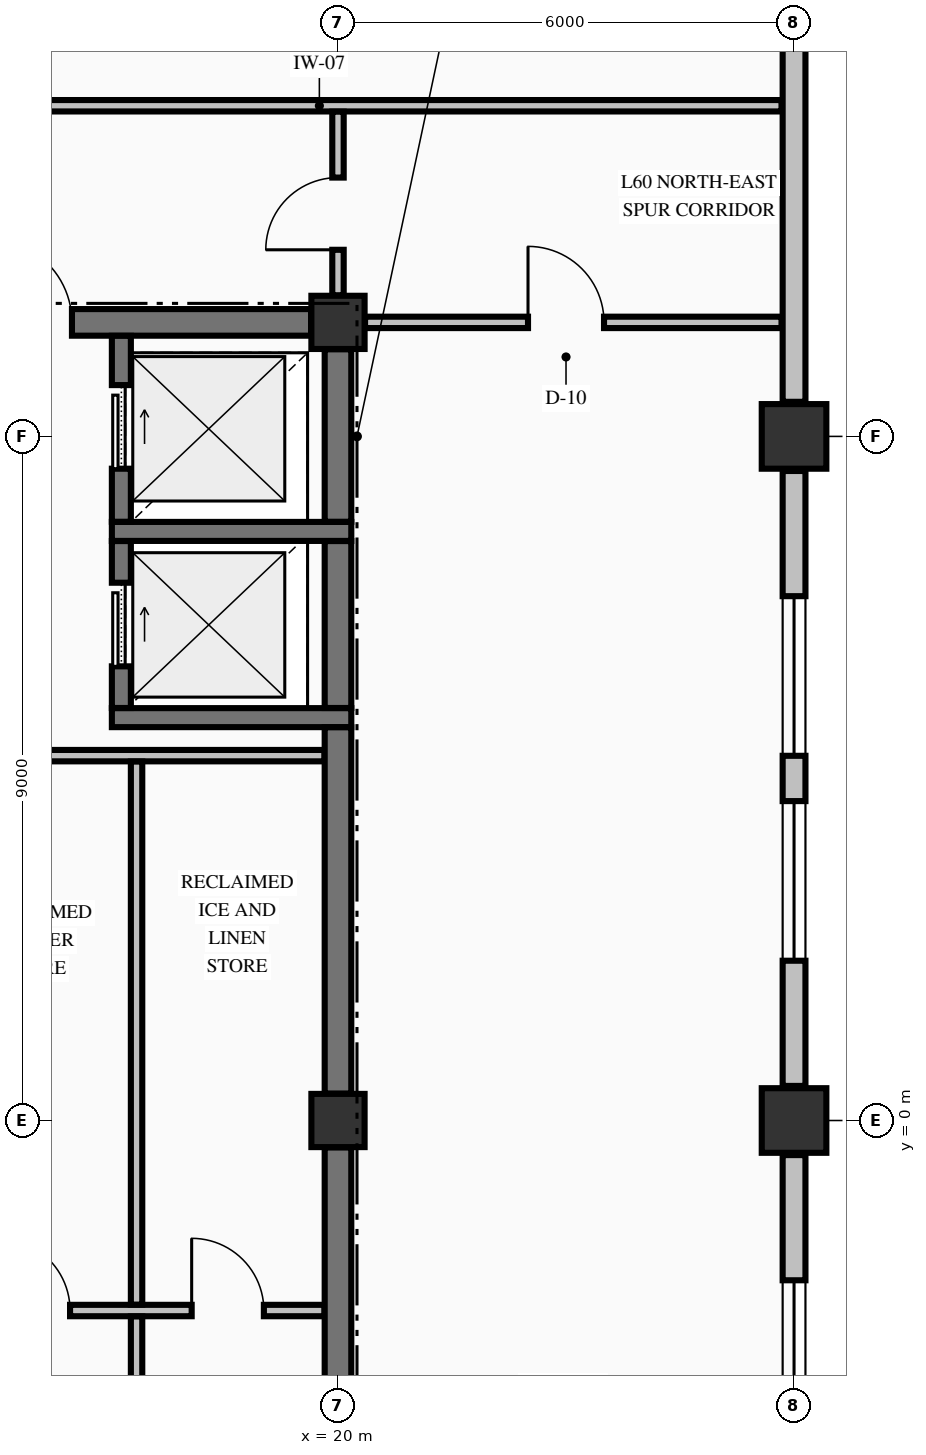
"""IFC4 building model, lengths in metres.
Left out: names, types, materials, properties, quantities, classifications, styles, units other than length and angle.
Written with IfcOpenShell. Run it as: python <this file> out.ifc"""

import sys

from ifc_helpers import new_model, si_unit, direction, frame, frame_2d, origin, origin_2d, place, context, subcontext, project, spatial, rectangle, extrude, element, fill, save


model = new_model("IFC4")
c1 = context("Model", 3, precision=1e-05, world=origin(), true_north=direction((0.0, 1.0)))
c2 = subcontext(c1, "Body", "Model", "MODEL_VIEW")
j1 = project(units=[si_unit("LENGTHUNIT", "METRE"), si_unit("PLANEANGLEUNIT", "RADIAN")], contexts=[c1])
p1 = place(None, origin())
s1 = spatial("IfcSite", under=j1, at=p1, CompositionType="ELEMENT")
p2 = place(p1, origin())
s2 = spatial("IfcBuilding", under=s1, at=p2, CompositionType="ELEMENT")
p3 = place(p2, frame((0.0, 0.0, 230.05)))
s3 = spatial("IfcBuildingStorey", under=s2, at=p3, CompositionType="ELEMENT", Elevation=230.05)
for number, where, z_axis, x_axis in (
    (1, (26.0, 0.0, -0.25), (0.0, 0.0, 1.0), (1.0, 0.0, 0.0)),
    (2, (26.0, 9.0, -0.25), (0.0, 0.0, 1.0), (1.0, 0.0, 0.0)),
):
    element("IfcColumn", number, at=place(p3, frame(where, z_axis=z_axis, x_axis=x_axis)), inside=s3, PredefinedType="COLUMN", context=c2, shape_type="SweptSolid", body=[
        extrude(rectangle(XDim=0.85, YDim=0.85, at=origin_2d()), origin(), (0.0, 0.0, 1.0), 3.23),
    ])
for number, where, z_axis, x_axis in (
    (3, (20.0, 10.5, -0.25), (0.0, 0.0, 1.0), (1.0, 0.0, 0.0)),
    (4, (20.0, 0.0, -0.25), (0.0, 0.0, 1.0), (1.0, 0.0, 0.0)),
):
    element("IfcColumn", number, at=place(p3, frame(where, z_axis=z_axis, x_axis=x_axis)), inside=s3, PredefinedType="COLUMN", context=c2, shape_type="SweptSolid", body=[
        extrude(rectangle(XDim=0.7, YDim=0.7, at=origin_2d()), origin(), (0.0, 0.0, 1.0), 3.23),
    ])
p4 = place(p3, frame((26.0, -8.545, 0.0), z_axis=(0.0, 0.0, 1.0), x_axis=(0.0, 1.0, 0.0)))
e5 = element("IfcWall", 5, at=p4, inside=s3, PredefinedType="STANDARD", context=c2, shape_type="SweptSolid", body=[
    extrude(rectangle(XDim=8.09, YDim=0.3, at=frame_2d((4.045, 0.0))), origin(), (0.0, 0.0, 1.0), 2.372),
])
p5 = place(p4, frame((1.647, 0.0, 0.7)))
e6 = element("IfcOpeningElement", 6, at=p5, cuts=e5, PredefinedType="OPENING", context=c2, shape_type="SweptSolid", body=[
    extrude(rectangle(XDim=2.1, YDim=1.5, at=frame_2d((1.05, 0.75))), frame((0.0, 0.16, 0.0), z_axis=(0.0, -1.0, 0.0), x_axis=(1.0, 0.0, 0.0)), (0.0, 0.0, 1.0), 0.32),
])
p6 = place(p4, frame((4.343, 0.0, 0.7)))
e7 = element("IfcOpeningElement", 7, at=p6, cuts=e5, PredefinedType="OPENING", context=c2, shape_type="SweptSolid", body=[
    extrude(rectangle(XDim=2.1, YDim=1.5, at=frame_2d((1.05, 0.75))), frame((0.0, 0.16, 0.0), z_axis=(0.0, -1.0, 0.0), x_axis=(1.0, 0.0, 0.0)), (0.0, 0.0, 1.0), 0.32),
])
p7 = place(p3, frame((26.0, 0.455, 0.0), z_axis=(0.0, 0.0, 1.0), x_axis=(0.0, 1.0, 0.0)))
e8 = element("IfcWall", 8, at=p7, inside=s3, PredefinedType="STANDARD", context=c2, shape_type="SweptSolid", body=[
    extrude(rectangle(XDim=8.09, YDim=0.3, at=frame_2d((4.045, 0.0))), origin(), (0.0, 0.0, 1.0), 2.372),
])
p8 = place(p7, frame((1.647, 0.0, 0.7)))
e9 = element("IfcOpeningElement", 9, at=p8, cuts=e8, PredefinedType="OPENING", context=c2, shape_type="SweptSolid", body=[
    extrude(rectangle(XDim=2.1, YDim=1.5, at=frame_2d((1.05, 0.75))), frame((0.0, 0.16, 0.0), z_axis=(0.0, -1.0, 0.0), x_axis=(1.0, 0.0, 0.0)), (0.0, 0.0, 1.0), 0.32),
])
p9 = place(p7, frame((4.343, 0.0, 0.7)))
e10 = element("IfcOpeningElement", 10, at=p9, cuts=e8, PredefinedType="OPENING", context=c2, shape_type="SweptSolid", body=[
    extrude(rectangle(XDim=2.1, YDim=1.5, at=frame_2d((1.05, 0.75))), frame((0.0, 0.16, 0.0), z_axis=(0.0, -1.0, 0.0), x_axis=(1.0, 0.0, 0.0)), (0.0, 0.0, 1.0), 0.32),
])
p10 = place(p3, frame((26.0, 9.455, 0.0), z_axis=(0.0, 0.0, 1.0), x_axis=(0.0, 1.0, 0.0)))
e11 = element("IfcWall", 11, at=p10, inside=s3, PredefinedType="STANDARD", context=c2, shape_type="SweptSolid", body=[
    extrude(rectangle(XDim=8.09, YDim=0.3, at=frame_2d((4.045, 0.0))), origin(), (0.0, 0.0, 1.0), 2.372),
])
for number, where, z_axis, x_axis in (
    (12, (17.025, 5.3, 0.0), (0.0, 0.0, 1.0), (1.0, 0.0, 0.0)),
    (13, (17.025, 7.75, 0.0), (0.0, 0.0, 1.0), (1.0, 0.0, 0.0)),
):
    element("IfcWall", number, at=place(p3, frame(where, z_axis=z_axis, x_axis=x_axis)), inside=s3, PredefinedType="SOLIDWALL", context=c2, shape_type="SweptSolid", body=[
        extrude(rectangle(XDim=3.15, YDim=0.25, at=frame_2d((1.575, 0.0))), origin(), (0.0, 0.0, 1.0), 2.98),
    ])
p11 = place(p3, frame((14.7, 10.5, 0.0), z_axis=(0.0, 0.0, 1.0), x_axis=(1.0, 0.0, 0.0)))
e14 = element("IfcWall", 14, at=p11, inside=s3, PredefinedType="SHEAR", context=c2, shape_type="SweptSolid", body=[
    extrude(rectangle(XDim=4.946, YDim=0.35, at=frame_2d((2.473, 0.0))), origin(), (0.0, 0.0, 1.0), 2.98),
])
p12 = place(p11, frame((0.7, 0.0, 0.0)))
e15 = element("IfcOpeningElement", 15, at=p12, cuts=e14, PredefinedType="OPENING", context=c2, shape_type="SweptSolid", body=[
    extrude(rectangle(XDim=1.1, YDim=2.15, at=frame_2d((0.55, 1.075))), frame((0.0, 0.185, 0.0), z_axis=(0.0, -1.0, 0.0), x_axis=(1.0, 0.0, 0.0)), (0.0, 0.0, 1.0), 0.37),
])
p13 = place(p3, frame((14.878, -2.5, 0.0), z_axis=(0.0, 0.0, 1.0), x_axis=(1.0, 0.0, 0.0)))
e16 = element("IfcWall", 16, at=p13, inside=s3, PredefinedType="PARTITIONING", context=c2, shape_type="SweptSolid", body=[
    extrude(rectangle(XDim=4.944, YDim=0.15, at=frame_2d((2.472, 0.0))), origin(), (0.0, 0.0, 1.0), 2.98),
])
p14 = place(p13, frame((0.647, 0.0, 0.0)))
e17 = element("IfcOpeningElement", 17, at=p14, cuts=e16, PredefinedType="OPENING", context=c2, shape_type="SweptSolid", body=[
    extrude(rectangle(XDim=0.95, YDim=2.15, at=frame_2d((0.475, 1.075))), frame((0.0, 0.085, 0.0), z_axis=(0.0, -1.0, 0.0), x_axis=(1.0, 0.0, 0.0)), (0.0, 0.0, 1.0), 0.17),
])
p15 = place(p13, frame((3.197, 0.0, 0.0)))
e18 = element("IfcOpeningElement", 18, at=p15, cuts=e16, PredefinedType="OPENING", context=c2, shape_type="SweptSolid", body=[
    extrude(rectangle(XDim=0.95, YDim=2.15, at=frame_2d((0.475, 1.075))), frame((0.0, 0.085, 0.0), z_axis=(0.0, -1.0, 0.0), x_axis=(1.0, 0.0, 0.0)), (0.0, 0.0, 1.0), 0.17),
])
p16 = place(p3, frame((14.878, 4.8, 0.0), z_axis=(0.0, 0.0, 1.0), x_axis=(1.0, 0.0, 0.0)))
e19 = element("IfcWall", 19, at=p16, inside=s3, PredefinedType="PARTITIONING", context=c2, shape_type="SweptSolid", body=[
    extrude(rectangle(XDim=4.944, YDim=0.15, at=frame_2d((2.472, 0.0))), origin(), (0.0, 0.0, 1.0), 2.98),
])
p17 = place(p3, frame((20.356, 10.5, 0.0), z_axis=(0.0, 0.0, 1.0), x_axis=(1.0, 0.0, 0.0)))
e20 = element("IfcWall", 20, at=p17, inside=s3, PredefinedType="PARTITIONING", context=c2, shape_type="SweptSolid", body=[
    extrude(rectangle(XDim=5.479, YDim=0.15, at=frame_2d((2.74, 0.0))), origin(), (0.0, 0.0, 1.0), 2.98),
])
p18 = place(p17, frame((2.144, 0.0, 0.0)))
e21 = element("IfcOpeningElement", 21, at=p18, cuts=e20, PredefinedType="OPENING", context=c2, shape_type="SweptSolid", body=[
    extrude(rectangle(XDim=1.0, YDim=2.15, at=frame_2d((0.5, 1.075))), frame((0.0, 0.085, 0.0), z_axis=(0.0, -1.0, 0.0), x_axis=(1.0, 0.0, 0.0)), (0.0, 0.0, 1.0), 0.17),
])
p19 = place(p3, frame((-20.075, 13.35, 0.0), z_axis=(0.0, 0.0, 1.0), x_axis=(1.0, 0.0, 0.0)))
e22 = element("IfcWall", 22, at=p19, inside=s3, PredefinedType="PARTITIONING", context=c2, shape_type="SweptSolid", body=[
    extrude(rectangle(XDim=45.91, YDim=0.15, at=frame_2d((22.955, 0.0))), origin(), (0.0, 0.0, 1.0), 2.98),
])
p20 = place(p19, frame((11.2, 0.0, 0.0)))
e23 = element("IfcOpeningElement", 23, at=p20, cuts=e22, PredefinedType="OPENING", context=c2, shape_type="SweptSolid", body=[
    extrude(rectangle(XDim=1.05, YDim=2.15, at=frame_2d((0.525, 1.075))), frame((0.0, 0.085, 0.0), z_axis=(0.0, -1.0, 0.0), x_axis=(1.0, 0.0, 0.0)), (0.0, 0.0, 1.0), 0.17),
])
p21 = place(p19, frame((24.4, 0.0, 0.0)))
e24 = element("IfcOpeningElement", 24, at=p21, cuts=e22, PredefinedType="OPENING", context=c2, shape_type="SweptSolid", body=[
    extrude(rectangle(XDim=1.05, YDim=2.15, at=frame_2d((0.525, 1.075))), frame((0.0, 0.085, 0.0), z_axis=(0.0, -1.0, 0.0), x_axis=(1.0, 0.0, 0.0)), (0.0, 0.0, 1.0), 0.17),
])
p22 = place(p19, frame((32.7, 0.0, 0.0)))
e25 = element("IfcOpeningElement", 25, at=p22, cuts=e22, PredefinedType="OPENING", context=c2, shape_type="SweptSolid", body=[
    extrude(rectangle(XDim=1.05, YDim=2.15, at=frame_2d((0.525, 1.075))), frame((0.0, 0.085, 0.0), z_axis=(0.0, -1.0, 0.0), x_axis=(1.0, 0.0, 0.0)), (0.0, 0.0, 1.0), 0.17),
])
p23 = place(p3, frame((17.15, 5.427, 0.0), z_axis=(0.0, 0.0, 1.0), x_axis=(0.0, 1.0, 0.0)))
e26 = element("IfcWall", 26, at=p23, inside=s3, PredefinedType="SOLIDWALL", context=c2, shape_type="SweptSolid", body=[
    extrude(rectangle(XDim=2.196, YDim=0.25, at=frame_2d((1.098, 0.0))), origin(), (0.0, 0.0, 1.0), 2.98),
])
p24 = place(p23, frame((0.548, 0.0, 0.0)))
e27 = element("IfcOpeningElement", 27, at=p24, cuts=e26, PredefinedType="OPENING", context=c2, shape_type="SweptSolid", body=[
    extrude(rectangle(XDim=1.1, YDim=2.2, at=frame_2d((0.55, 1.1))), frame((0.0, 0.135, 0.0), z_axis=(0.0, -1.0, 0.0), x_axis=(1.0, 0.0, 0.0)), (0.0, 0.0, 1.0), 0.27),
])
p25 = place(p3, frame((17.15, 7.877, 0.0), z_axis=(0.0, 0.0, 1.0), x_axis=(0.0, 1.0, 0.0)))
e28 = element("IfcWall", 28, at=p25, inside=s3, PredefinedType="SOLIDWALL", context=c2, shape_type="SweptSolid", body=[
    extrude(rectangle(XDim=2.446, YDim=0.25, at=frame_2d((1.223, 0.0))), origin(), (0.0, 0.0, 1.0), 2.98),
])
p26 = place(p25, frame((0.698, 0.0, 0.0)))
e29 = element("IfcOpeningElement", 29, at=p26, cuts=e28, PredefinedType="OPENING", context=c2, shape_type="SweptSolid", body=[
    extrude(rectangle(XDim=1.1, YDim=2.2, at=frame_2d((0.55, 1.1))), frame((0.0, 0.135, 0.0), z_axis=(0.0, -1.0, 0.0), x_axis=(1.0, 0.0, 0.0)), (0.0, 0.0, 1.0), 0.27),
])
p27 = place(p3, frame((20.0, -9.596, 0.0), z_axis=(0.0, 0.0, 1.0), x_axis=(0.0, 1.0, 0.0)))
e30 = element("IfcWall", 30, at=p27, inside=s3, PredefinedType="SHEAR", context=c2, shape_type="SweptSolid", body=[
    extrude(rectangle(XDim=9.242, YDim=0.35, at=frame_2d((4.621, 0.0))), origin(), (0.0, 0.0, 1.0), 2.98),
])
p28 = place(p3, frame((20.0, 0.354, 0.0), z_axis=(0.0, 0.0, 1.0), x_axis=(0.0, 1.0, 0.0)))
e31 = element("IfcWall", 31, at=p28, inside=s3, PredefinedType="SHEAR", context=c2, shape_type="SweptSolid", body=[
    extrude(rectangle(XDim=4.819, YDim=0.35, at=frame_2d((2.41, 0.0))), origin(), (0.0, 0.0, 1.0), 2.98),
])
p29 = place(p3, frame((20.0, 5.427, 0.0), z_axis=(0.0, 0.0, 1.0), x_axis=(0.0, 1.0, 0.0)))
e32 = element("IfcWall", 32, at=p29, inside=s3, PredefinedType="SHEAR", context=c2, shape_type="SweptSolid", body=[
    extrude(rectangle(XDim=2.196, YDim=0.35, at=frame_2d((1.098, 0.0))), origin(), (0.0, 0.0, 1.0), 2.98),
])
p30 = place(p3, frame((20.0, 7.877, 0.0), z_axis=(0.0, 0.0, 1.0), x_axis=(0.0, 1.0, 0.0)))
e33 = element("IfcWall", 33, at=p30, inside=s3, PredefinedType="SHEAR", context=c2, shape_type="SweptSolid", body=[
    extrude(rectangle(XDim=2.269, YDim=0.35, at=frame_2d((1.135, 0.0))), origin(), (0.0, 0.0, 1.0), 2.98),
])
p31 = place(p3, frame((17.35, -9.772, 0.0), z_axis=(0.0, 0.0, 1.0), x_axis=(0.0, 1.0, 0.0)))
e34 = element("IfcWall", 34, at=p31, inside=s3, PredefinedType="PARTITIONING", context=c2, shape_type="SweptSolid", body=[
    extrude(rectangle(XDim=7.194, YDim=0.15, at=frame_2d((3.597, 0.0))), origin(), (0.0, 0.0, 1.0), 2.98),
])
p32 = place(p3, frame((17.35, -2.422, 0.0), z_axis=(0.0, 0.0, 1.0), x_axis=(0.0, 1.0, 0.0)))
e35 = element("IfcWall", 35, at=p32, inside=s3, PredefinedType="PARTITIONING", context=c2, shape_type="SweptSolid", body=[
    extrude(rectangle(XDim=7.144, YDim=0.15, at=frame_2d((3.572, 0.0))), origin(), (0.0, 0.0, 1.0), 2.98),
])
p33 = place(p3, frame((20.0, 10.856, 0.0), z_axis=(0.0, 0.0, 1.0), x_axis=(0.0, 1.0, 0.0)))
e36 = element("IfcWall", 36, at=p33, inside=s3, PredefinedType="PARTITIONING", context=c2, shape_type="SweptSolid", body=[
    extrude(rectangle(XDim=2.416, YDim=0.15, at=frame_2d((1.208, 0.0))), origin(), (0.0, 0.0, 1.0), 2.98),
])
p34 = place(p33, frame((0.599, 0.0, 0.0)))
e37 = element("IfcOpeningElement", 37, at=p34, cuts=e36, PredefinedType="OPENING", context=c2, shape_type="SweptSolid", body=[
    extrude(rectangle(XDim=0.95, YDim=2.15, at=frame_2d((0.475, 1.075))), frame((0.0, 0.085, 0.0), z_axis=(0.0, -1.0, 0.0), x_axis=(1.0, 0.0, 0.0)), (0.0, 0.0, 1.0), 0.17),
])
p35 = place(p6, origin())
e38 = element("IfcWindow", 38, at=p35, inside=s3, PartitioningType="SINGLE_PANEL", PredefinedType="WINDOW", context=c2, shape_type="SweptSolid", body=[
    extrude(rectangle(XDim=2.1, YDim=1.5, at=frame_2d((1.05, 0.75))), frame((0.0, 0.03, 0.0), z_axis=(0.0, -1.0, 0.0), x_axis=(1.0, 0.0, 0.0)), (0.0, 0.0, 1.0), 0.06),
])
fill(e7, e38)
p36 = place(p8, origin())
e39 = element("IfcWindow", 39, at=p36, inside=s3, PartitioningType="SINGLE_PANEL", PredefinedType="WINDOW", context=c2, shape_type="SweptSolid", body=[
    extrude(rectangle(XDim=2.1, YDim=1.5, at=frame_2d((1.05, 0.75))), frame((0.0, 0.03, 0.0), z_axis=(0.0, -1.0, 0.0), x_axis=(1.0, 0.0, 0.0)), (0.0, 0.0, 1.0), 0.06),
])
fill(e9, e39)
p37 = place(p9, origin())
e40 = element("IfcWindow", 40, at=p37, inside=s3, PartitioningType="SINGLE_PANEL", PredefinedType="WINDOW", context=c2, shape_type="SweptSolid", body=[
    extrude(rectangle(XDim=2.1, YDim=1.5, at=frame_2d((1.05, 0.75))), frame((0.0, 0.03, 0.0), z_axis=(0.0, -1.0, 0.0), x_axis=(1.0, 0.0, 0.0)), (0.0, 0.0, 1.0), 0.06),
])
fill(e10, e40)
p38 = place(p24, origin())
e41 = element("IfcDoor", 41, at=p38, inside=s3, OperationType="SLIDING_TO_RIGHT", PredefinedType="DOOR", context=c2, shape_type="SweptSolid", body=[
    extrude(rectangle(XDim=1.1, YDim=2.2, at=frame_2d((0.55, 1.1))), frame((0.0, 0.025, 0.0), z_axis=(0.0, -1.0, 0.0), x_axis=(1.0, 0.0, 0.0)), (0.0, 0.0, 1.0), 0.05),
])
fill(e27, e41)
p39 = place(p26, origin())
e42 = element("IfcDoor", 42, at=p39, inside=s3, OperationType="SLIDING_TO_RIGHT", PredefinedType="DOOR", context=c2, shape_type="SweptSolid", body=[
    extrude(rectangle(XDim=1.1, YDim=2.2, at=frame_2d((0.55, 1.1))), frame((0.0, 0.025, 0.0), z_axis=(0.0, -1.0, 0.0), x_axis=(1.0, 0.0, 0.0)), (0.0, 0.0, 1.0), 0.05),
])
fill(e29, e42)
p40 = place(p12, origin())
e43 = element("IfcDoor", 43, at=p40, inside=s3, OperationType="SINGLE_SWING_LEFT", PredefinedType="DOOR", context=c2, shape_type="SweptSolid", body=[
    extrude(rectangle(XDim=1.1, YDim=2.15, at=frame_2d((0.55, 1.075))), frame((0.0, 0.025, 0.0), z_axis=(0.0, -1.0, 0.0), x_axis=(1.0, 0.0, 0.0)), (0.0, 0.0, 1.0), 0.05),
])
fill(e15, e43)
p41 = place(p14, origin())
e44 = element("IfcDoor", 44, at=p41, inside=s3, OperationType="SINGLE_SWING_LEFT", PredefinedType="DOOR", context=c2, shape_type="SweptSolid", body=[
    extrude(rectangle(XDim=0.95, YDim=2.15, at=frame_2d((0.475, 1.075))), frame((0.0, 0.025, 0.0), z_axis=(0.0, -1.0, 0.0), x_axis=(1.0, 0.0, 0.0)), (0.0, 0.0, 1.0), 0.05),
])
fill(e17, e44)
p42 = place(p15, origin())
e45 = element("IfcDoor", 45, at=p42, inside=s3, OperationType="SINGLE_SWING_LEFT", PredefinedType="DOOR", context=c2, shape_type="SweptSolid", body=[
    extrude(rectangle(XDim=0.95, YDim=2.15, at=frame_2d((0.475, 1.075))), frame((0.0, 0.025, 0.0), z_axis=(0.0, -1.0, 0.0), x_axis=(1.0, 0.0, 0.0)), (0.0, 0.0, 1.0), 0.05),
])
fill(e18, e45)
p43 = place(p34, origin())
e46 = element("IfcDoor", 46, at=p43, inside=s3, OperationType="SINGLE_SWING_LEFT", PredefinedType="DOOR", context=c2, shape_type="SweptSolid", body=[
    extrude(rectangle(XDim=0.95, YDim=2.15, at=frame_2d((0.475, 1.075))), frame((0.0, 0.025, 0.0), z_axis=(0.0, -1.0, 0.0), x_axis=(1.0, 0.0, 0.0)), (0.0, 0.0, 1.0), 0.05),
])
fill(e37, e46)
p44 = place(p18, origin())
e47 = element("IfcDoor", 47, at=p44, inside=s3, OperationType="SINGLE_SWING_LEFT", PredefinedType="DOOR", context=c2, shape_type="SweptSolid", body=[
    extrude(rectangle(XDim=1.0, YDim=2.15, at=frame_2d((0.5, 1.075))), frame((0.0, 0.025, 0.0), z_axis=(0.0, -1.0, 0.0), x_axis=(1.0, 0.0, 0.0)), (0.0, 0.0, 1.0), 0.05),
])
fill(e21, e47)
save(model, sys.argv[1])
